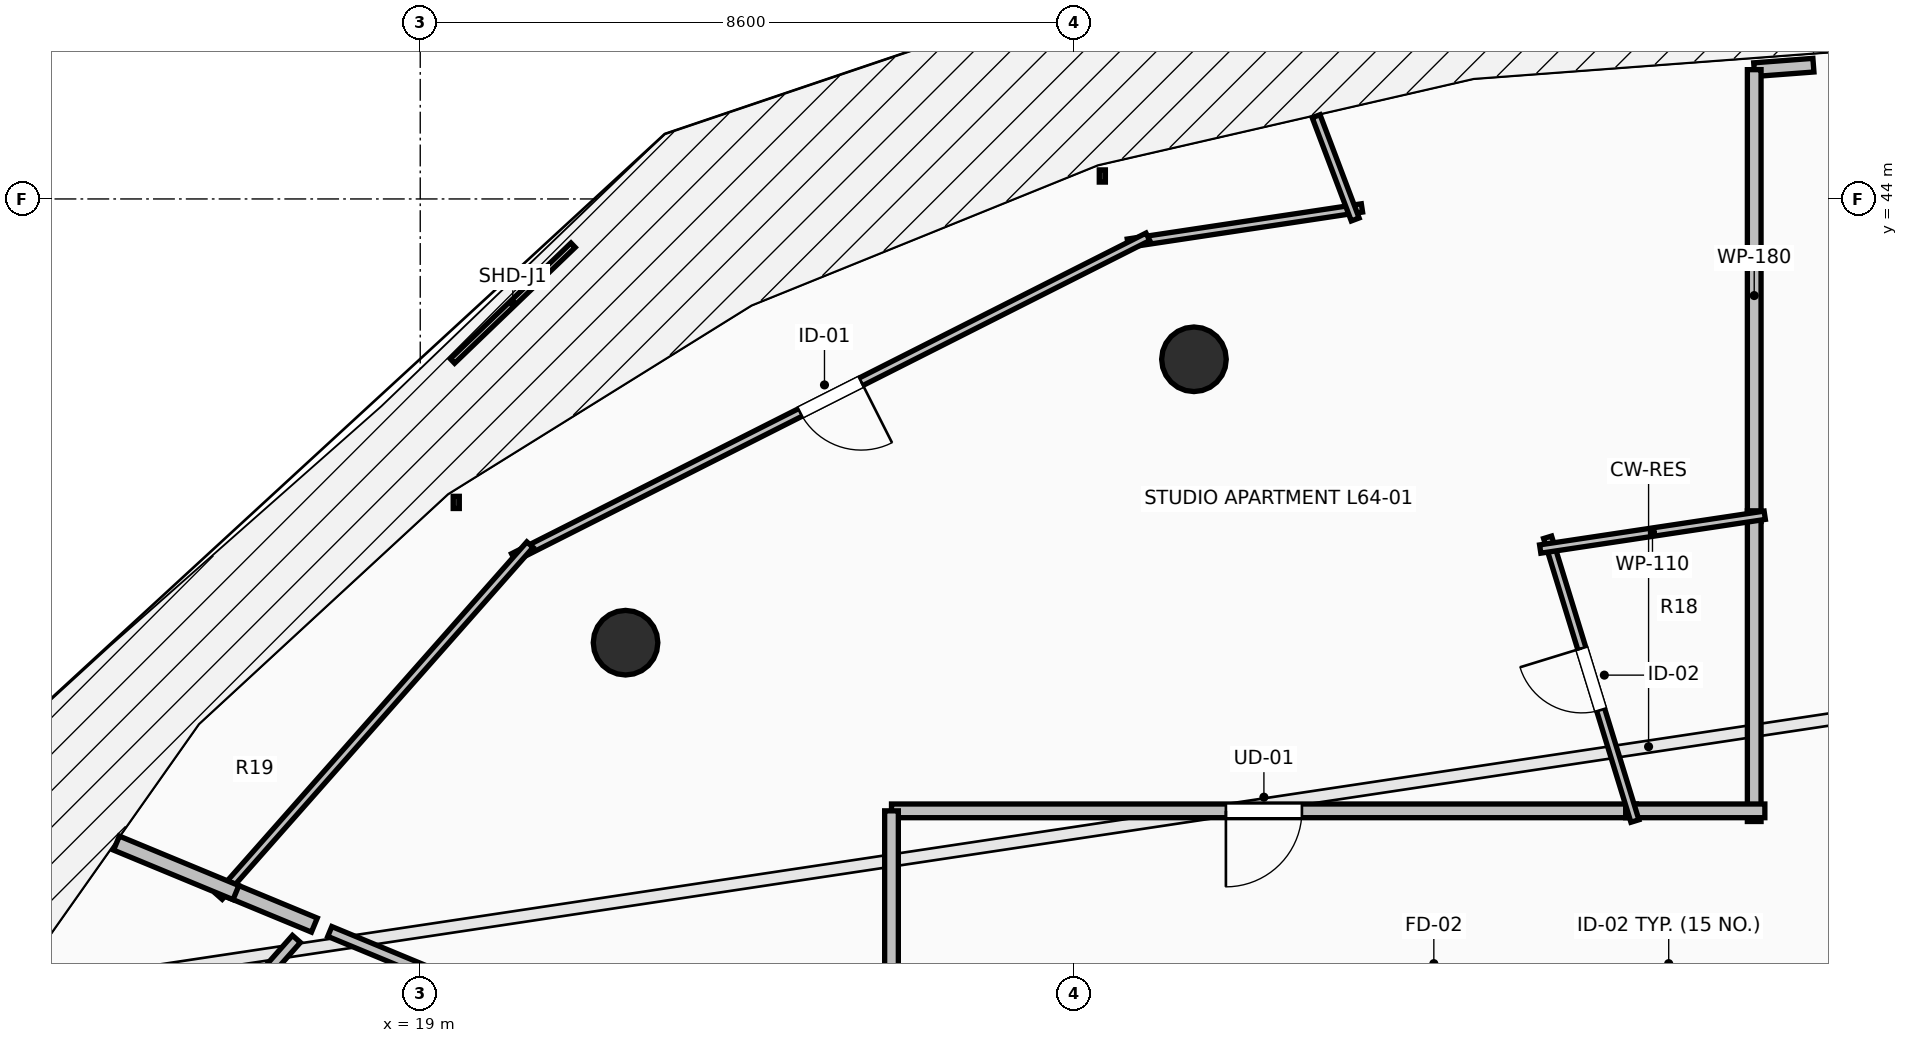
"""IFC4 building model, lengths in metres.
Left out: names, types, materials, properties, quantities, classifications, styles, units other than length and angle.
Written with IfcOpenShell. Run it as: python <this file> out.ifc"""

import sys

from ifc_helpers import new_model, si_unit, direction, frame, frame_2d, origin, origin_2d, place, context, subcontext, project, spatial, rectangle, circle, extrude, element, fill, save


model = new_model("IFC4")
c1 = context("Model", 3, precision=1e-05, world=origin(), true_north=direction((0.0, 1.0)))
c2 = subcontext(c1, "Body", "Model", "MODEL_VIEW")
j1 = project(units=[si_unit("LENGTHUNIT", "METRE"), si_unit("PLANEANGLEUNIT", "RADIAN")], contexts=[c1])
p1 = place(None, origin())
s1 = spatial("IfcSite", under=j1, at=p1, CompositionType="ELEMENT")
p2 = place(p1, origin())
s2 = spatial("IfcBuilding", under=s1, at=p2, CompositionType="ELEMENT")
p3 = place(p2, frame((0.0, 0.0, 237.8)))
s3 = spatial("IfcBuildingStorey", under=s2, at=p3, CompositionType="ELEMENT", Elevation=237.8)
for number, where, z_axis, x_axis in (
    (1, (29.179, 41.891, 0.0), (0.0, 0.0, 1.0), (-0.383, 0.924, 0.0)),
    (2, (21.701, 38.162, 0.0), (0.0, 0.0, 1.0), (-0.707, 0.707, 0.0)),
):
    element("IfcColumn", number, at=place(p3, frame(where, z_axis=z_axis, x_axis=x_axis)), inside=s3, PredefinedType="COLUMN", context=c2, shape_type="SweptSolid", body=[
        extrude(circle(Radius=0.425, at=origin_2d()), origin(), (0.0, 0.0, 1.0), 3.55),
    ])
p4 = place(p3, frame((37.329, 45.76, 0.0), z_axis=(0.0, 0.0, 1.0), x_axis=(-0.997136622012, -0.0756211415, 0.0)))
e3 = element("IfcWall", 3, at=p4, inside=s3, PredefinedType="PARTITIONING", context=c2, shape_type="SweptSolid", body=[
    extrude(rectangle(XDim=0.781, YDim=0.18, at=frame_2d((0.391, 0.0))), origin(), (0.0, 0.0, 1.0), 3.29),
])
p5 = place(p3, frame((36.55, 45.701, 0.0), z_axis=(0.0, 0.0, 1.0), x_axis=(0.0, -1.0, 0.0)))
e4 = element("IfcWall", 4, at=p5, inside=s3, PredefinedType="PARTITIONING", context=c2, shape_type="SweptSolid", body=[
    extrude(rectangle(XDim=5.944, YDim=0.18, at=frame_2d((2.972, 0.0))), origin(), (0.0, 0.0, 1.0), 2.482),
])
p6 = place(p3, frame((34.999, 35.95, 0.0), z_axis=(0.0, 0.0, 1.0), x_axis=(-1.0, 0.0, 0.0)))
e5 = element("IfcWall", 5, at=p6, inside=s3, PredefinedType="PARTITIONING", context=c2, shape_type="SweptSolid", body=[
    extrude(rectangle(XDim=9.799, YDim=0.18, at=frame_2d((4.899, 0.0))), origin(), (0.0, 0.0, 1.0), 2.482),
])
p7 = place(p6, frame((4.399, 0.0, 0.0)))
e6 = element("IfcOpeningElement", 6, at=p7, cuts=e5, PredefinedType="OPENING", context=c2, shape_type="SweptSolid", body=[
    extrude(rectangle(XDim=1.0, YDim=2.15, at=frame_2d((0.5, 1.075))), frame((0.0, 0.105, 0.0), z_axis=(0.0, -1.0, 0.0), x_axis=(1.0, 0.0, 0.0)), (0.0, 0.0, 1.0), 0.21),
])
p8 = place(p3, frame((25.2, 35.95, 0.0), z_axis=(0.0, 0.0, 1.0), x_axis=(0.0, -1.0, 0.0)))
e7 = element("IfcWall", 7, at=p8, inside=s3, PredefinedType="PARTITIONING", context=c2, shape_type="SweptSolid", body=[
    extrude(rectangle(XDim=4.708, YDim=0.18, at=frame_2d((2.354, 0.0))), origin(), (0.0, 0.0, 1.0), 2.482),
])
p9 = place(p3, frame((36.55, 39.897, 0.0), z_axis=(0.0, 0.0, 1.0), x_axis=(0.0, -1.0, 0.0)))
e8 = element("IfcWall", 8, at=p9, inside=s3, PredefinedType="PARTITIONING", context=c2, shape_type="SweptSolid", body=[
    extrude(rectangle(XDim=4.087, YDim=0.18, at=frame_2d((2.043, 0.0))), origin(), (0.0, 0.0, 1.0), 2.924),
])
p10 = place(p3, frame((36.69, 35.95, 0.0), z_axis=(0.0, 0.0, 1.0), x_axis=(-1.0, 0.0, 0.0)))
e9 = element("IfcWall", 9, at=p10, inside=s3, PredefinedType="PARTITIONING", context=c2, shape_type="SweptSolid", body=[
    extrude(rectangle(XDim=1.831, YDim=0.18, at=frame_2d((0.916, 0.0))), origin(), (0.0, 0.0, 1.0), 3.29),
])
p11 = place(p3, frame((34.98, 35.816, 0.0), z_axis=(0.0, 0.0, 1.0), x_axis=(-0.29406827714, 0.955784415221, 0.0)))
e10 = element("IfcWall", 10, at=p11, inside=s3, PredefinedType="PARTITIONING", context=c2, shape_type="SweptSolid", body=[
    extrude(rectangle(XDim=3.905, YDim=0.11, at=frame_2d((1.953, 0.0))), origin(), (0.0, 0.0, 1.0), 2.482),
])
p12 = place(p11, frame((1.528, 0.0, 0.0)))
e11 = element("IfcOpeningElement", 11, at=p12, cuts=e10, PredefinedType="OPENING", context=c2, shape_type="SweptSolid", body=[
    extrude(rectangle(XDim=0.85, YDim=2.1, at=frame_2d((0.425, 1.05))), frame((0.0, 0.07, 0.0), z_axis=(0.0, -1.0, 0.0), x_axis=(1.0, 0.0, 0.0)), (0.0, 0.0, 1.0), 0.14),
])
p13 = place(p3, frame((33.735, 39.394, 0.0), z_axis=(0.0, 0.0, 1.0), x_axis=(0.988862493006, 0.148832019156, 0.0)))
e12 = element("IfcWall", 12, at=p13, inside=s3, PredefinedType="PARTITIONING", context=c2, shape_type="SweptSolid", body=[
    extrude(rectangle(XDim=2.987, YDim=0.11, at=frame_2d((1.494, 0.0))), origin(), (0.0, 0.0, 1.0), 2.482),
])
p14 = place(p3, frame((31.389, 43.882, 0.0), z_axis=(0.0, 0.0, 1.0), x_axis=(-0.988858596585, -0.148857905265, 0.0)))
e13 = element("IfcWall", 13, at=p14, inside=s3, PredefinedType="PARTITIONING", context=c2, shape_type="SweptSolid", body=[
    extrude(rectangle(XDim=3.115, YDim=0.11, at=frame_2d((1.557, 0.0))), origin(), (0.0, 0.0, 1.0), 3.29),
])
p15 = place(p3, frame((28.573, 43.502, 0.0), z_axis=(0.0, 0.0, 1.0), x_axis=(-0.892502876412, -0.451041700507, 0.0)))
e14 = element("IfcWall", 14, at=p15, inside=s3, PredefinedType="PARTITIONING", context=c2, shape_type="SweptSolid", body=[
    extrude(rectangle(XDim=9.352, YDim=0.11, at=frame_2d((4.676, 0.0))), origin(), (0.0, 0.0, 1.0), 3.29),
])
p16 = place(p15, frame((4.226, 0.0, 0.0)))
e15 = element("IfcOpeningElement", 15, at=p16, cuts=e14, PredefinedType="OPENING", context=c2, shape_type="SweptSolid", body=[
    extrude(rectangle(XDim=0.9, YDim=2.1, at=frame_2d((0.45, 1.05))), frame((0.0, 0.07, 0.0), z_axis=(0.0, -1.0, 0.0), x_axis=(1.0, 0.0, 0.0)), (0.0, 0.0, 1.0), 0.14),
])
p17 = place(p3, frame((20.444, 39.452, 0.0), z_axis=(0.0, 0.0, 1.0), x_axis=(-0.662167862663, -0.749355537549, 0.0)))
e16 = element("IfcWall", 16, at=p17, inside=s3, PredefinedType="PARTITIONING", context=c2, shape_type="SweptSolid", body=[
    extrude(rectangle(XDim=6.177, YDim=0.11, at=frame_2d((3.089, 0.0))), origin(), (0.0, 0.0, 1.0), 3.29),
])
p18 = place(p3, frame((30.787, 45.089, 0.0), z_axis=(0.0, 0.0, 1.0), x_axis=(0.353737146492, -0.935344872863, 0.0)))
e17 = element("IfcWall", 17, at=p18, inside=s3, PredefinedType="PARTITIONING", context=c2, shape_type="SweptSolid", body=[
    extrude(rectangle(XDim=1.453, YDim=0.11, at=frame_2d((0.727, 0.0))), origin(), (0.0, 0.0, 1.0), 3.29),
])
p19 = place(p3, frame((16.446, 34.928, 0.0), z_axis=(0.0, 0.0, 1.0), x_axis=(0.923851056351, -0.382752172663, 0.0)))
e18 = element("IfcWall", 18, at=p19, inside=s3, PredefinedType="PARTITIONING", context=c2, shape_type="SweptSolid", body=[
    extrude(rectangle(XDim=1.257, YDim=0.2, at=frame_2d((0.628, 0.0))), origin(), (0.0, 0.0, 1.0), 3.29),
])
p20 = place(p3, frame((15.004, 35.526, 0.0), z_axis=(0.0, 0.0, 1.0), x_axis=(0.923843638485, -0.382770076719, 0.0)))
e19 = element("IfcWall", 19, at=p20, inside=s3, PredefinedType="PARTITIONING", context=c2, shape_type="SweptSolid", body=[
    extrude(rectangle(XDim=1.701, YDim=0.2, at=frame_2d((0.851, 0.0))), origin(), (0.0, 0.0, 1.0), 3.29),
])
p21 = place(p3, frame((17.81, 34.363, 0.0), z_axis=(0.0, 0.0, 1.0), x_axis=(0.923888322618, -0.382662210481, 0.0)))
e20 = element("IfcWall", 20, at=p21, inside=s3, PredefinedType="PARTITIONING", context=c2, shape_type="SweptSolid", body=[
    extrude(rectangle(XDim=1.829, YDim=0.14, at=frame_2d((0.915, 0.0))), origin(), (0.0, 0.0, 1.0), 2.874),
])
p22 = place(p3, frame((16.123, 32.853, 0.0), z_axis=(0.0, 0.0, 1.0), x_axis=(0.662302679983, 0.749236384652, 0.0)))
e21 = element("IfcWall", 21, at=p22, inside=s3, PredefinedType="PARTITIONING", context=c2, shape_type="SweptSolid", body=[
    extrude(rectangle(XDim=1.885, YDim=0.14, at=frame_2d((0.942, 0.0))), origin(), (0.0, 0.0, 1.0), 3.29),
])
p23 = place(p7, origin())
e22 = element("IfcDoor", 22, at=p23, inside=s3, OperationType="SINGLE_SWING_RIGHT", PredefinedType="DOOR", context=c2, shape_type="SweptSolid", body=[
    extrude(rectangle(XDim=1.0, YDim=2.15, at=frame_2d((0.5, 1.075))), frame((0.0, 0.025, 0.0), z_axis=(0.0, -1.0, 0.0), x_axis=(1.0, 0.0, 0.0)), (0.0, 0.0, 1.0), 0.05),
])
fill(e6, e22)
p24 = place(p12, origin())
e23 = element("IfcDoor", 23, at=p24, inside=s3, OperationType="SINGLE_SWING_RIGHT", PredefinedType="DOOR", context=c2, shape_type="SweptSolid", body=[
    extrude(rectangle(XDim=0.85, YDim=2.1, at=frame_2d((0.425, 1.05))), frame((0.0, 0.025, 0.0), z_axis=(0.0, -1.0, 0.0), x_axis=(1.0, 0.0, 0.0)), (0.0, 0.0, 1.0), 0.05),
])
fill(e11, e23)
p25 = place(p16, origin())
e24 = element("IfcDoor", 24, at=p25, inside=s3, OperationType="SINGLE_SWING_LEFT", PredefinedType="DOOR", context=c2, shape_type="SweptSolid", body=[
    extrude(rectangle(XDim=0.9, YDim=2.1, at=frame_2d((0.45, 1.05))), frame((0.0, 0.025, 0.0), z_axis=(0.0, -1.0, 0.0), x_axis=(1.0, 0.0, 0.0)), (0.0, 0.0, 1.0), 0.05),
])
fill(e15, e24)
save(model, sys.argv[1])
